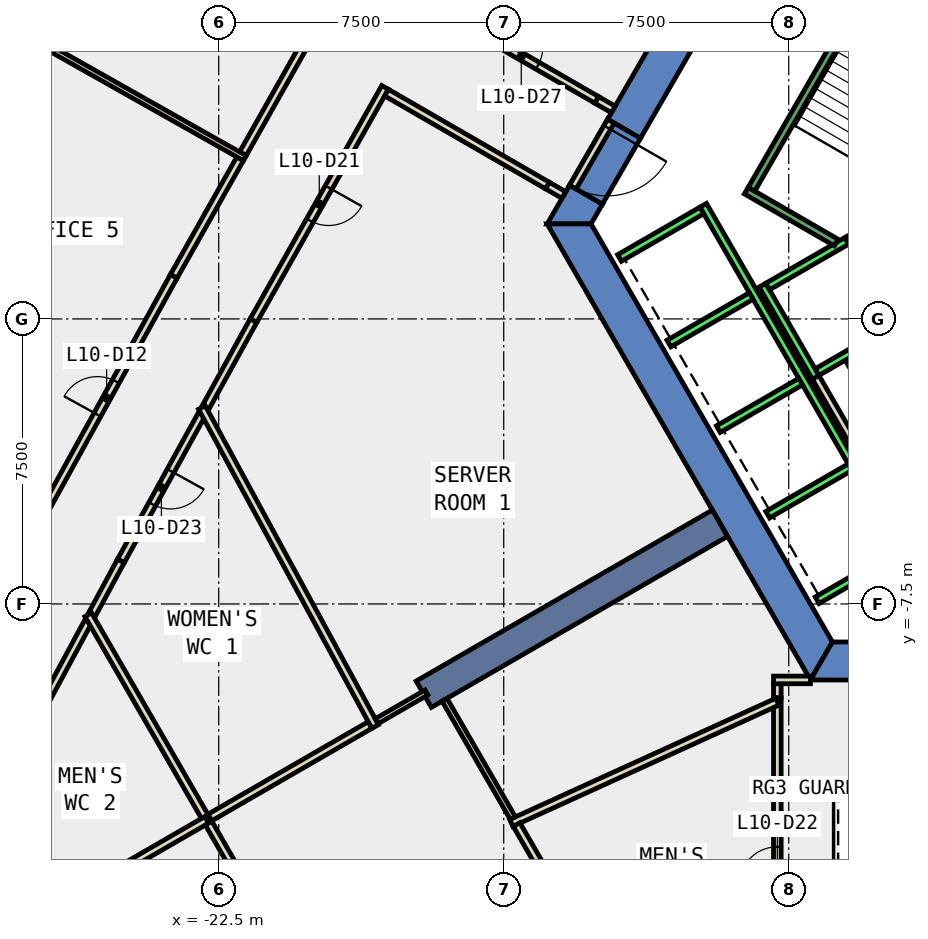
"""IFC4 building model, lengths in metres.
Left out: names, types, materials, properties, quantities, classifications, styles, units other than length and angle.
Written with IfcOpenShell. Run it as: python <this file> out.ifc"""

import sys

from ifc_helpers import new_model, si_unit, direction, frame, frame_2d, origin, place, context, subcontext, project, spatial, polyline, rectangle, outline, extrude, element, fill, save


model = new_model("IFC4")
c1 = context("Model", 3, precision=1e-05, world=origin(), true_north=direction((0.0, 1.0)))
c2 = subcontext(c1, "Body", "Model", "MODEL_VIEW")
j1 = project(units=[si_unit("LENGTHUNIT", "METRE"), si_unit("PLANEANGLEUNIT", "RADIAN")], contexts=[c1])
p1 = place(None, origin())
s1 = spatial("IfcSite", under=j1, at=p1, CompositionType="ELEMENT")
p2 = place(p1, origin())
s2 = spatial("IfcBuilding", under=s1, at=p2, CompositionType="ELEMENT")
p3 = place(p2, frame((0.0, 0.0, 51.8)))
s3 = spatial("IfcBuildingStorey", under=s2, at=p3, CompositionType="ELEMENT", Elevation=51.8)
p4 = place(p3, frame((0.0, 0.0, -0.4)))
e1 = element("IfcWall", 1, at=p4, inside=s3, PredefinedType="SHEAR", context=c2, shape_type="SweptSolid", body=[
    extrude(outline(polyline([(-12.267, 5.252), (-11.402, 4.752), (-6.351, 13.5), (-6.928, 14.5), (-12.267, 5.252)])), origin(), (0.0, 0.0, 1.0), 4.2),
])
p5 = place(p3, frame((0.0, 0.0, -0.4)))
e2 = element("IfcWall", 2, at=p5, inside=s3, PredefinedType="SHEAR", context=c2, shape_type="SweptSolid", body=[
    extrude(outline(polyline([(-12.402, 3.02), (-13.267, 3.52), (-13.856, 2.5), (-12.702, 2.5), (-12.402, 3.02)])), origin(), (0.0, 0.0, 1.0), 4.2),
])
p6 = place(p3, frame((0.0, 0.0, 3.6)))
e3 = element("IfcWall", 3, at=p6, inside=s3, PredefinedType="SHEAR", context=c2, shape_type="SweptSolid", body=[
    extrude(outline(polyline([(-13.267, 3.52), (-12.402, 3.02), (-11.402, 4.752), (-12.267, 5.252), (-13.267, 3.52)])), origin(), (0.0, 0.0, 1.0), 0.2),
])
p7 = place(p3, frame((0.0, 0.0, -0.4)))
e4 = element("IfcWall", 4, at=p7, inside=s3, PredefinedType="SHEAR", context=c2, shape_type="SweptSolid", body=[
    extrude(outline(polyline([(-13.856, 2.5), (-6.928, -9.5), (-6.351, -8.5), (-12.702, 2.5), (-13.856, 2.5)])), origin(), (0.0, 0.0, 1.0), 4.2),
])
p8 = place(p3, frame((0.0, 0.0, -0.4)))
e5 = element("IfcWall", 5, at=p8, inside=s3, PredefinedType="SHEAR", context=c2, shape_type="SweptSolid", body=[
    extrude(outline(polyline([(3.75, -9.5), (3.75, -8.5), (-6.351, -8.5), (-6.928, -9.5), (3.75, -9.5)])), origin(), (0.0, 0.0, 1.0), 4.2),
])
p9 = place(p3, frame((-9.31, -5.375, -0.4), z_axis=(0.0, 0.0, 1.0), x_axis=(-0.866017533419, -0.500013631625, 0.0)))
e6 = element("IfcWall", 6, at=p9, inside=s3, PredefinedType="SHEAR", context=c2, shape_type="SweptSolid", body=[
    extrude(rectangle(XDim=9.0, YDim=0.8, at=frame_2d((4.5, 0.0))), origin(), (0.0, 0.0, 1.0), 4.2),
])
p10 = place(p3, frame((-16.96, 8.308, 0.0), z_axis=(0.0, 0.0, 1.0), x_axis=(0.866018717003, -0.500011581666, 0.0)))
e7 = element("IfcWall", 7, at=p10, inside=s3, PredefinedType="PARTITIONING", context=c2, shape_type="SweptSolid", body=[
    extrude(rectangle(XDim=5.092, YDim=0.2, at=frame_2d((2.546, 0.0))), origin(), (0.0, 0.0, 1.0), 3.8),
])
p11 = place(p10, frame((2.296, 0.0, 0.0)))
e8 = element("IfcOpeningElement", 8, at=p11, cuts=e7, PredefinedType="OPENING", context=c2, shape_type="SweptSolid", body=[
    extrude(rectangle(XDim=1.0, YDim=2.1, at=frame_2d((0.5, 1.05))), frame((0.0, 0.11, 0.0), z_axis=(0.0, -1.0, 0.0), x_axis=(1.0, 0.0, 0.0)), (0.0, 0.0, 1.0), 0.22),
])
p12 = place(p3, frame((-13.417, 3.26, 0.0), z_axis=(0.0, 0.0, 1.0), x_axis=(-0.866071776036, 0.499919672301, 0.0)))
e9 = element("IfcWall", 9, at=p12, inside=s3, PredefinedType="PARTITIONING", context=c2, shape_type="SweptSolid", body=[
    extrude(rectangle(XDim=0.5, YDim=0.2, at=frame_2d((0.25, 0.0))), origin(), (0.0, 0.0, 1.0), 2.4),
])
p13 = place(p3, frame((-18.122, 6.092, 0.0), z_axis=(0.0, 0.0, 1.0), x_axis=(-0.491430359405, -0.870916874251, 0.0)))
e10 = element("IfcWall", 10, at=p13, inside=s3, PredefinedType="PARTITIONING", context=c2, shape_type="SweptSolid", body=[
    extrude(rectangle(XDim=7.047, YDim=0.2, at=frame_2d((3.523, 0.0))), origin(), (0.0, 0.0, 1.0), 3.8),
])
p14 = place(p13, frame((3.024, 0.0, 0.0)))
e11 = element("IfcOpeningElement", 11, at=p14, cuts=e10, PredefinedType="OPENING", context=c2, shape_type="SweptSolid", body=[
    extrude(rectangle(XDim=1.0, YDim=2.1, at=frame_2d((0.5, 1.05))), frame((0.0, 0.11, 0.0), z_axis=(0.0, -1.0, 0.0), x_axis=(1.0, 0.0, 0.0)), (0.0, 0.0, 1.0), 0.22),
])
p15 = place(p3, frame((-21.585, -0.045, 0.0), z_axis=(0.0, 0.0, 1.0), x_axis=(-0.483139162319, -0.875543573921, 0.0)))
e12 = element("IfcWall", 12, at=p15, inside=s3, PredefinedType="PARTITIONING", context=c2, shape_type="SweptSolid", body=[
    extrude(rectangle(XDim=2.61, YDim=0.2, at=frame_2d((1.305, 0.0))), origin(), (0.0, 0.0, 1.0), 3.8),
])
p16 = place(p3, frame((-22.942, -2.505, 0.0), z_axis=(0.0, 0.0, 1.0), x_axis=(-0.48320751977, -0.875505849688, 0.0)))
e13 = element("IfcWall", 13, at=p16, inside=s3, PredefinedType="PARTITIONING", context=c2, shape_type="SweptSolid", body=[
    extrude(rectangle(XDim=4.412, YDim=0.2, at=frame_2d((2.206, 0.0))), origin(), (0.0, 0.0, 1.0), 3.8),
])
p17 = place(p16, frame((1.706, 0.0, 0.0)))
e14 = element("IfcOpeningElement", 14, at=p17, cuts=e13, PredefinedType="OPENING", context=c2, shape_type="SweptSolid", body=[
    extrude(rectangle(XDim=1.0, YDim=2.1, at=frame_2d((0.5, 1.05))), frame((0.0, 0.11, 0.0), z_axis=(0.0, -1.0, 0.0), x_axis=(1.0, 0.0, 0.0)), (0.0, 0.0, 1.0), 0.22),
])
p18 = place(p3, frame((-25.074, -6.368, 0.0), z_axis=(0.0, 0.0, 1.0), x_axis=(-0.474616646546, -0.880192614614, 0.0)))
e15 = element("IfcWall", 15, at=p18, inside=s3, PredefinedType="PARTITIONING", context=c2, shape_type="SweptSolid", body=[
    extrude(rectangle(XDim=1.605, YDim=0.2, at=frame_2d((0.803, 0.0))), origin(), (0.0, 0.0, 1.0), 3.8),
])
p19 = place(p3, frame((-25.931, -7.957, 0.0), z_axis=(0.0, 0.0, 1.0), x_axis=(-0.474554072379, -0.880226352928, 0.0)))
e16 = element("IfcWall", 16, at=p19, inside=s3, PredefinedType="PARTITIONING", context=c2, shape_type="SweptSolid", body=[
    extrude(rectangle(XDim=5.416, YDim=0.2, at=frame_2d((2.708, 0.0))), origin(), (0.0, 0.0, 1.0), 3.8),
])
p20 = place(p3, frame((-21.863, 4.345, 0.0), z_axis=(0.0, 0.0, 1.0), x_axis=(0.491394823876, 0.87093692485, 0.0)))
e17 = element("IfcWall", 17, at=p20, inside=s3, PredefinedType="PARTITIONING", context=c2, shape_type="SweptSolid", body=[
    extrude(rectangle(XDim=3.547, YDim=0.2, at=frame_2d((1.773, 0.0))), origin(), (0.0, 0.0, 1.0), 3.8),
])
p21 = place(p3, frame((-27.217, -5.284, 0.0), z_axis=(0.0, 0.0, 1.0), x_axis=(0.483151415114, 0.875536812517, 0.0)))
e18 = element("IfcWall", 18, at=p21, inside=s3, PredefinedType="PARTITIONING", context=c2, shape_type="SweptSolid", body=[
    extrude(rectangle(XDim=7.319, YDim=0.2, at=frame_2d((3.659, 0.0))), origin(), (0.0, 0.0, 1.0), 3.8),
])
p22 = place(p21, frame((3.159, 0.0, 0.0)))
e19 = element("IfcOpeningElement", 19, at=p22, cuts=e18, PredefinedType="OPENING", context=c2, shape_type="SweptSolid", body=[
    extrude(rectangle(XDim=1.0, YDim=2.1, at=frame_2d((0.5, 1.05))), frame((0.0, 0.11, 0.0), z_axis=(0.0, -1.0, 0.0), x_axis=(1.0, 0.0, 0.0)), (0.0, 0.0, 1.0), 0.22),
])
p23 = place(p3, frame((-23.681, 1.124, 0.0), z_axis=(0.0, 0.0, 1.0), x_axis=(0.491485799319, 0.870885588965, 0.0)))
e20 = element("IfcWall", 20, at=p23, inside=s3, PredefinedType="PARTITIONING", context=c2, shape_type="SweptSolid", body=[
    extrude(rectangle(XDim=3.548, YDim=0.2, at=frame_2d((1.774, 0.0))), origin(), (0.0, 0.0, 1.0), 3.8),
])
p24 = place(p3, frame((-5.126, -2.422, 0.0), z_axis=(0.0, 0.0, 1.0), x_axis=(-0.500062241894, 0.865989465428, 0.0)))
e21 = element("IfcWall", 21, at=p24, inside=s3, PredefinedType="PARTITIONING", context=c2, shape_type="SweptSolid", body=[
    extrude(rectangle(XDim=1.7, YDim=0.2, at=frame_2d((0.85, 0.0))), origin(), (0.0, 0.0, 1.0), 3.8),
])
p25 = place(p3, frame((-5.492, -3.788, 0.0), z_axis=(0.0, 0.0, 1.0), x_axis=(-0.500008949224, 0.866020236886, 0.0)))
e22 = element("IfcWall", 22, at=p25, inside=s3, PredefinedType="PARTITIONING", context=c2, shape_type="SweptSolid", body=[
    extrude(rectangle(XDim=2.68, YDim=0.2, at=frame_2d((1.34, 0.0))), origin(), (0.0, 0.0, 1.0), 3.8),
])
p26 = place(p3, frame((-7.8, -9.972, 0.0), z_axis=(0.0, 0.0, 1.0), x_axis=(0.0, 1.0, 0.0)))
e23 = element("IfcWall", 23, at=p26, inside=s3, PredefinedType="PARTITIONING", context=c2, shape_type="SweptSolid", body=[
    extrude(rectangle(XDim=0.373, YDim=0.2, at=frame_2d((0.187, 0.0))), origin(), (0.0, 0.0, 1.0), 3.8),
])
p27 = place(p3, frame((-7.9, -9.499, 0.0), z_axis=(0.0, 0.0, 1.0), x_axis=(1.0, 0.0, 0.0)))
e24 = element("IfcWall", 24, at=p27, inside=s3, PredefinedType="PARTITIONING", context=c2, shape_type="SweptSolid", body=[
    extrude(rectangle(XDim=0.971, YDim=0.2, at=frame_2d((0.485, 0.0))), origin(), (0.0, 0.0, 1.0), 3.8),
])
p28 = place(p3, frame((-7.8, -18.809, 0.0), z_axis=(0.0, 0.0, 1.0), x_axis=(0.0, 1.0, 0.0)))
e25 = element("IfcWall", 25, at=p28, inside=s3, PredefinedType="PARTITIONING", context=c2, shape_type="SweptSolid", body=[
    extrude(rectangle(XDim=8.837, YDim=0.2, at=frame_2d((4.418, 0.0))), origin(), (0.0, 0.0, 1.0), 3.8),
])
p29 = place(p28, frame((3.918, 0.0, 0.0)))
e26 = element("IfcOpeningElement", 26, at=p29, cuts=e25, PredefinedType="OPENING", context=c2, shape_type="SweptSolid", body=[
    extrude(rectangle(XDim=1.0, YDim=2.1, at=frame_2d((0.5, 1.05))), frame((0.0, 0.11, 0.0), z_axis=(0.0, -1.0, 0.0), x_axis=(1.0, 0.0, 0.0)), (0.0, 0.0, 1.0), 0.22),
])
p30 = place(p3, frame((-7.8, -10.072, 0.0), z_axis=(0.0, 0.0, 1.0), x_axis=(-0.910011899741, -0.414582129777, 0.0)))
e27 = element("IfcWall", 27, at=p30, inside=s3, PredefinedType="PARTITIONING", context=c2, shape_type="SweptSolid", body=[
    extrude(rectangle(XDim=7.694, YDim=0.2, at=frame_2d((3.847, 0.0))), origin(), (0.0, 0.0, 1.0), 3.8),
])
p31 = place(p3, frame((-18.384, -10.725, 0.0), z_axis=(0.0, 0.0, 1.0), x_axis=(-0.477137547132, 0.878828630119, 0.0)))
e28 = element("IfcWall", 28, at=p31, inside=s3, PredefinedType="PARTITIONING", context=c2, shape_type="SweptSolid", body=[
    extrude(rectangle(XDim=9.552, YDim=0.2, at=frame_2d((4.776, 0.0))), origin(), (0.0, 0.0, 1.0), 3.8),
])
p32 = place(p3, frame((-14.761, -13.134, 0.0), z_axis=(0.0, 0.0, 1.0), x_axis=(-0.499704810774, 0.866195764299, 0.0)))
e29 = element("IfcWall", 29, at=p32, inside=s3, PredefinedType="PARTITIONING", context=c2, shape_type="SweptSolid", body=[
    extrude(rectangle(XDim=3.594, YDim=0.15, at=frame_2d((1.797, 0.0))), origin(), (0.0, 0.0, 1.0), 3.8),
])
p33 = place(p3, frame((-17.033, -9.829, 0.0), z_axis=(0.0, 0.0, 1.0), x_axis=(-0.866094414679, -0.49988045057, 0.0)))
e30 = element("IfcWall", 30, at=p33, inside=s3, PredefinedType="PARTITIONING", context=c2, shape_type="SweptSolid", body=[
    extrude(rectangle(XDim=1.516, YDim=0.15, at=frame_2d((0.758, 0.0))), origin(), (0.0, 0.0, 1.0), 3.8),
])
p34 = place(p3, frame((-11.527, -18.735, 0.0), z_axis=(0.0, 0.0, 1.0), x_axis=(-0.499976457224, 0.866038995786, 0.0)))
e31 = element("IfcWall", 31, at=p34, inside=s3, PredefinedType="PARTITIONING", context=c2, shape_type="SweptSolid", body=[
    extrude(rectangle(XDim=6.268, YDim=0.2, at=frame_2d((3.134, 0.0))), origin(), (0.0, 0.0, 1.0), 3.8),
])
p35 = place(p3, frame((-18.519, -10.687, 0.0), z_axis=(0.0, 0.0, 1.0), x_axis=(-0.866063668779, -0.499933717229, 0.0)))
e32 = element("IfcWall", 32, at=p35, inside=s3, PredefinedType="PARTITIONING", context=c2, shape_type="SweptSolid", body=[
    extrude(rectangle(XDim=4.969, YDim=0.2, at=frame_2d((2.484, 0.0))), origin(), (0.0, 0.0, 1.0), 3.8),
])
p36 = place(p3, frame((-22.822, -13.171, 0.0), z_axis=(0.0, 0.0, 1.0), x_axis=(-0.499974913987, 0.866039886717, 0.0)))
e33 = element("IfcWall", 33, at=p36, inside=s3, PredefinedType="PARTITIONING", context=c2, shape_type="SweptSolid", body=[
    extrude(rectangle(XDim=6.222, YDim=0.2, at=frame_2d((3.111, 0.0))), origin(), (0.0, 0.0, 1.0), 3.8),
])
p37 = place(p3, frame((-19.699, -18.581, 0.0), z_axis=(0.0, 0.0, 1.0), x_axis=(-0.499899838407, 0.866083224385, 0.0)))
e34 = element("IfcWall", 34, at=p37, inside=s3, PredefinedType="PARTITIONING", context=c2, shape_type="SweptSolid", body=[
    extrude(rectangle(XDim=6.235, YDim=0.2, at=frame_2d((3.118, 0.0))), origin(), (0.0, 0.0, 1.0), 3.8),
])
p38 = place(p3, frame((-22.816, -13.181, 0.0), z_axis=(0.0, 0.0, 1.0), x_axis=(-0.86601529143, -0.500017514703, 0.0)))
e35 = element("IfcWall", 35, at=p38, inside=s3, PredefinedType="PARTITIONING", context=c2, shape_type="SweptSolid", body=[
    extrude(rectangle(XDim=9.932, YDim=0.2, at=frame_2d((4.966, 0.0))), origin(), (0.0, 0.0, 1.0), 3.8),
])
p39 = place(p3, frame((-21.813, 4.231, 0.0), z_axis=(0.0, 0.0, 1.0), x_axis=(-0.870901264369, 0.491458022337, 0.0)))
e36 = element("IfcWall", 36, at=p39, inside=s3, PredefinedType="PARTITIONING", context=c2, shape_type="SweptSolid", body=[
    extrude(rectangle(XDim=7.6, YDim=0.15, at=frame_2d((3.8, 0.0))), origin(), (0.0, 0.0, 1.0), 3.8),
])
p40 = place(p3, frame((-12.18, 5.202, 0.0), z_axis=(0.0, 0.0, 1.0), x_axis=(-0.50002537861, -0.866010750942, 0.0)))
e37 = element("IfcWall", 37, at=p40, inside=s3, PredefinedType="PARTITIONING", context=c2, shape_type="SweptSolid", body=[
    extrude(rectangle(XDim=2.0, YDim=0.2, at=frame_2d((1.0, 0.0))), origin(), (0.0, 0.0, 1.0), 2.4),
])
p41 = place(p40, frame((0.19, 0.0, 0.0)))
e38 = element("IfcOpeningElement", 38, at=p41, cuts=e37, PredefinedType="OPENING", context=c2, shape_type="SweptSolid", body=[
    extrude(rectangle(XDim=1.8, YDim=2.1, at=frame_2d((0.9, 1.05))), frame((0.0, 0.11, 0.0), z_axis=(0.0, -1.0, 0.0), x_axis=(1.0, 0.0, 0.0)), (0.0, 0.0, 1.0), 0.22),
])
p42 = place(p3, frame((-12.55, 5.762, 0.0), z_axis=(0.0, 0.0, 1.0), x_axis=(0.866071776036, -0.499919672301, 0.0)))
e39 = element("IfcWall", 39, at=p42, inside=s3, PredefinedType="PARTITIONING", context=c2, shape_type="SweptSolid", body=[
    extrude(rectangle(XDim=0.5, YDim=0.2, at=frame_2d((0.25, 0.0))), origin(), (0.0, 0.0, 1.0), 2.4),
])
p43 = place(p3, frame((-13.85, 3.51, 0.0), z_axis=(0.0, 0.0, 1.0), x_axis=(-0.865969361037, 0.500097056325, 0.0)))
e40 = element("IfcWall", 40, at=p43, inside=s3, PredefinedType="PARTITIONING", context=c2, shape_type="SweptSolid", body=[
    extrude(rectangle(XDim=4.889, YDim=0.2, at=frame_2d((2.445, 0.0))), origin(), (0.0, 0.0, 1.0), 3.8),
])
p44 = place(p3, frame((-5.94, 2.188, 0.0), z_axis=(0.0, 0.0, 1.0), x_axis=(0.49994636267, -0.866056369097, 0.0)))
e41 = element("IfcWall", 41, at=p44, inside=s3, PredefinedType="STANDARD", context=c2, shape_type="SweptSolid", body=[
    extrude(rectangle(XDim=2.8, YDim=0.2, at=frame_2d((1.4, 0.0))), origin(), (0.0, 0.0, 1.0), 3.8),
])
p45 = place(p44, frame((1.225, 0.0, 0.0)))
e42 = element("IfcOpeningElement", 42, at=p45, cuts=e41, PredefinedType="OPENING", context=c2, shape_type="SweptSolid", body=[
    extrude(rectangle(XDim=1.1, YDim=2.1, at=frame_2d((0.55, 1.05))), frame((0.0, 0.11, 0.0), z_axis=(0.0, -1.0, 0.0), x_axis=(1.0, 0.0, 0.0)), (0.0, 0.0, 1.0), 0.22),
])
p46 = place(p3, frame((-8.192, 0.888, 0.0), z_axis=(0.0, 0.0, 1.0), x_axis=(0.49994636267, -0.866056369097, 0.0)))
e43 = element("IfcWall", 43, at=p46, inside=s3, PredefinedType="STANDARD", context=c2, shape_type="SweptSolid", body=[
    extrude(rectangle(XDim=2.8, YDim=0.2, at=frame_2d((1.4, 0.0))), origin(), (0.0, 0.0, 1.0), 3.8),
])
for number, where, z_axis, x_axis in (
    (44, (-5.977, 2.052, 0.0), (0.0, 0.0, 1.0), (-0.866, -0.5, 0.0)),
    (45, (-4.677, -0.2, 0.0), (0.0, 0.0, 1.0), (-0.866, -0.5, 0.0)),
):
    element("IfcWall", number, at=place(p3, frame(where, z_axis=z_axis, x_axis=x_axis)), inside=s3, PredefinedType="STANDARD", context=c2, shape_type="SweptSolid", body=[
        extrude(rectangle(XDim=2.399, YDim=0.2, at=frame_2d((1.2, 0.0))), origin(), (0.0, 0.0, 1.0), 3.8),
    ])
p47 = place(p3, frame((-9.751, 2.99, 0.0), z_axis=(0.0, 0.0, 1.0), x_axis=(0.50000090737, -0.866024879913, 0.0)))
e46 = element("IfcWall", 46, at=p47, inside=s3, PredefinedType="STANDARD", context=c2, shape_type="SweptSolid", body=[
    extrude(rectangle(XDim=10.6, YDim=0.2, at=frame_2d((5.3, 0.0))), origin(), (0.0, 0.0, 1.0), 3.8),
])
p48 = place(p3, frame((-9.788, 2.853, 0.0), z_axis=(0.0, 0.0, 1.0), x_axis=(-0.865998541277, -0.500046524342, 0.0)))
e47 = element("IfcWall", 47, at=p48, inside=s3, PredefinedType="STANDARD", context=c2, shape_type="SweptSolid", body=[
    extrude(rectangle(XDim=2.5, YDim=0.2, at=frame_2d((1.25, 0.0))), origin(), (0.0, 0.0, 1.0), 3.8),
])
for number, where, z_axis, x_axis in (
    (48, (-8.488, 0.602, 0.0), (0.0, 0.0, 1.0), (-0.866, -0.5, 0.0)),
    (49, (-7.188, -1.65, 0.0), (0.0, 0.0, 1.0), (-0.866, -0.5, 0.0)),
    (50, (-5.888, -3.902, 0.0), (0.0, 0.0, 1.0), (-0.866, -0.5, 0.0)),
    (51, (-4.588, -6.153, 0.0), (0.0, 0.0, 1.0), (-0.866, -0.5, 0.0)),
):
    element("IfcWall", number, at=place(p3, frame(where, z_axis=z_axis, x_axis=x_axis)), inside=s3, PredefinedType="STANDARD", context=c2, shape_type="SweptSolid", body=[
        extrude(rectangle(XDim=2.5, YDim=0.2, at=frame_2d((1.25, 0.0))), origin(), (0.0, 0.0, 1.0), 3.8),
    ])
p49 = place(p3, frame((-6.25, 2.01, 0.0), z_axis=(0.0, 0.0, 1.0), x_axis=(-0.86611865017, 0.499838457731, 0.0)))
e52 = element("IfcWall", 52, at=p49, inside=s3, PredefinedType="STANDARD", context=c2, shape_type="SweptSolid", body=[
    extrude(rectangle(XDim=2.733, YDim=0.2, at=frame_2d((1.366, 0.0))), origin(), (0.0, 0.0, 1.0), 3.8),
])
p50 = place(p3, frame((-5.03, 9.388, 0.0), z_axis=(0.0, 0.0, 1.0), x_axis=(-0.499978703459, -0.866037698999, 0.0)))
e53 = element("IfcWall", 53, at=p50, inside=s3, PredefinedType="STANDARD", context=c2, shape_type="SweptSolid", body=[
    extrude(rectangle(XDim=6.9, YDim=0.2, at=frame_2d((3.45, 0.0))), origin(), (0.0, 0.0, 1.0), 3.8),
])
p51 = place(p22, origin())
e54 = element("IfcDoor", 54, at=p51, inside=s3, OperationType="SINGLE_SWING_LEFT", PredefinedType="DOOR", context=c2, shape_type="SweptSolid", body=[
    extrude(rectangle(XDim=1.0, YDim=2.1, at=frame_2d((0.5, 1.05))), frame((0.0, 0.025, 0.0), z_axis=(0.0, -1.0, 0.0), x_axis=(1.0, 0.0, 0.0)), (0.0, 0.0, 1.0), 0.05),
])
fill(e19, e54)
p52 = place(p14, origin())
e55 = element("IfcDoor", 55, at=p52, inside=s3, OperationType="SINGLE_SWING_LEFT", PredefinedType="DOOR", context=c2, shape_type="SweptSolid", body=[
    extrude(rectangle(XDim=1.0, YDim=2.1, at=frame_2d((0.5, 1.05))), frame((0.0, 0.025, 0.0), z_axis=(0.0, -1.0, 0.0), x_axis=(1.0, 0.0, 0.0)), (0.0, 0.0, 1.0), 0.05),
])
fill(e11, e55)
p53 = place(p29, origin())
e56 = element("IfcDoor", 56, at=p53, inside=s3, OperationType="SINGLE_SWING_RIGHT", PredefinedType="DOOR", context=c2, shape_type="SweptSolid", body=[
    extrude(rectangle(XDim=1.0, YDim=2.1, at=frame_2d((0.5, 1.05))), frame((0.0, 0.025, 0.0), z_axis=(0.0, -1.0, 0.0), x_axis=(1.0, 0.0, 0.0)), (0.0, 0.0, 1.0), 0.05),
])
fill(e26, e56)
p54 = place(p17, origin())
e57 = element("IfcDoor", 57, at=p54, inside=s3, OperationType="SINGLE_SWING_LEFT", PredefinedType="DOOR", context=c2, shape_type="SweptSolid", body=[
    extrude(rectangle(XDim=1.0, YDim=2.1, at=frame_2d((0.5, 1.05))), frame((0.0, 0.025, 0.0), z_axis=(0.0, -1.0, 0.0), x_axis=(1.0, 0.0, 0.0)), (0.0, 0.0, 1.0), 0.05),
])
fill(e14, e57)
p55 = place(p11, origin())
e58 = element("IfcDoor", 58, at=p55, inside=s3, OperationType="SINGLE_SWING_LEFT", PredefinedType="DOOR", context=c2, shape_type="SweptSolid", body=[
    extrude(rectangle(XDim=1.0, YDim=2.1, at=frame_2d((0.5, 1.05))), frame((0.0, 0.025, 0.0), z_axis=(0.0, -1.0, 0.0), x_axis=(1.0, 0.0, 0.0)), (0.0, 0.0, 1.0), 0.05),
])
fill(e8, e58)
p56 = place(p41, origin())
e59 = element("IfcDoor", 59, at=p56, inside=s3, OperationType="DOUBLE_DOOR_SINGLE_SWING", PredefinedType="DOOR", context=c2, shape_type="SweptSolid", body=[
    extrude(rectangle(XDim=1.8, YDim=2.1, at=frame_2d((0.9, 1.05))), frame((0.0, 0.025, 0.0), z_axis=(0.0, -1.0, 0.0), x_axis=(1.0, 0.0, 0.0)), (0.0, 0.0, 1.0), 0.05),
])
fill(e38, e59)
save(model, sys.argv[1])
